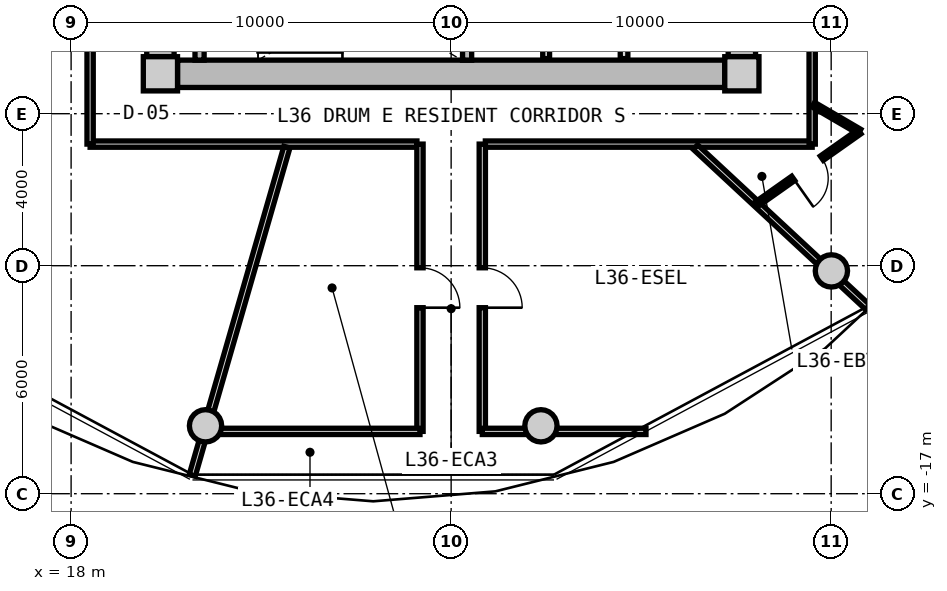
"""IFC4 building model, lengths in metres.
Left out: names, types, materials, properties, quantities, classifications, styles, units other than length and angle.
Written with IfcOpenShell. Run it as: python <this file> out.ifc"""

import sys

from ifc_helpers import new_model, si_unit, direction, frame, frame_2d, origin, origin_2d, place, context, subcontext, project, spatial, rectangle, circle, extrude, source, transform, mapped, element, fill, save


model = new_model("IFC4")
c1 = context("Model", 3, precision=1e-05, world=origin(), true_north=direction((0.0, 1.0)))
c2 = subcontext(c1, "Body", "Model", "MODEL_VIEW")
j1 = project(units=[si_unit("LENGTHUNIT", "METRE"), si_unit("PLANEANGLEUNIT", "RADIAN")], contexts=[c1])
p1 = place(None, origin())
s1 = spatial("IfcSite", under=j1, at=p1, CompositionType="ELEMENT")
p2 = place(p1, origin())
s2 = spatial("IfcBuilding", under=s1, at=p2, CompositionType="ELEMENT")
p3 = place(p2, frame((0.0, 0.0, 117.6)))
s3 = spatial("IfcBuildingStorey", under=s2, at=p3, CompositionType="ELEMENT", Elevation=117.6)
m1 = source(origin(), c2, "Body", "SweptSolid", [
    extrude(rectangle(XDim=0.9, YDim=0.9, at=origin_2d()), origin(), (0.0, 0.0, 1.0), 3.05),
])
for number, where, z_axis, x_axis in (
    (1, (20.35, -5.95, 0.0), (0.0, 0.0, 1.0), (1.0, 0.0, 0.0)),
    (2, (35.65, -5.95, 0.0), (0.0, 0.0, 1.0), (1.0, 0.0, 0.0)),
):
    element("IfcColumn", number, at=place(p3, frame(where, z_axis=z_axis, x_axis=x_axis)), inside=s3, PredefinedType="COLUMN", context=c2, shape_type="MappedRepresentation", body=[
        mapped(m1, transform((0.0, 0.0, 0.0), x_axis=(1.0, 0.0, 0.0), y_axis=(0.0, 1.0, 0.0), z_axis=(0.0, 0.0, 1.0), scale=1.0)),
    ])
m2 = source(origin(), c2, "Body", "SweptSolid", [
    extrude(rectangle(XDim=14.4, YDim=0.72, at=frame_2d((7.2, 0.0))), origin(), (0.0, 0.0, 1.0), 2.79),
])
p4 = place(p3, frame((35.2, -5.95, 0.0), z_axis=(0.0, 0.0, 1.0), x_axis=(-1.0, 0.0, 0.0)))
e3 = element("IfcWall", 3, at=p4, inside=s3, PredefinedType="SHEAR", context=c2, shape_type="MappedRepresentation", body=[
    mapped(m2, transform((0.0, 0.0, 0.0), x_axis=(1.0, 0.0, 0.0), y_axis=(0.0, 1.0, 0.0), z_axis=(0.0, 0.0, 1.0), scale=1.0)),
])
m3 = source(origin(), c2, "Body", "SweptSolid", [
    extrude(rectangle(XDim=11.0, YDim=0.72, at=frame_2d((5.5, 0.0))), origin(), (0.0, 0.0, 1.0), 2.79),
])
p5 = place(p3, frame((20.35, -5.5, 0.0), z_axis=(0.0, 0.0, 1.0), x_axis=(0.0, 1.0, 0.0)))
e4 = element("IfcWall", 4, at=p5, inside=s3, PredefinedType="SHEAR", context=c2, shape_type="MappedRepresentation", body=[
    mapped(m3, transform((0.0, 0.0, 0.0), x_axis=(1.0, 0.0, 0.0), y_axis=(0.0, 1.0, 0.0), z_axis=(0.0, 0.0, 1.0), scale=1.0)),
])
p6 = place(p5, frame((3.8, 0.0, 0.0)))
e5 = element("IfcOpeningElement", 5, at=p6, cuts=e4, PredefinedType="OPENING", context=c2, shape_type="SweptSolid", body=[
    extrude(rectangle(XDim=1.2, YDim=2.15, at=frame_2d((0.6, 1.075))), frame((0.0, 0.37, 0.0), z_axis=(0.0, -1.0, 0.0), x_axis=(1.0, 0.0, 0.0)), (0.0, 0.0, 1.0), 0.74),
])
p7 = place(p3, frame((35.65, 5.5, 0.0), z_axis=(0.0, 0.0, 1.0), x_axis=(0.0, -1.0, 0.0)))
e6 = element("IfcWall", 6, at=p7, inside=s3, PredefinedType="SHEAR", context=c2, shape_type="MappedRepresentation", body=[
    mapped(m3, transform((0.0, 0.0, 0.0), x_axis=(1.0, 0.0, 0.0), y_axis=(0.0, 1.0, 0.0), z_axis=(0.0, 0.0, 1.0), scale=1.0)),
])
p8 = place(p7, frame((5.65, 0.0, 0.0)))
e7 = element("IfcOpeningElement", 7, at=p8, cuts=e6, PredefinedType="OPENING", context=c2, shape_type="SweptSolid", body=[
    extrude(rectangle(XDim=1.2, YDim=2.15, at=frame_2d((0.6, 1.075))), frame((0.0, 0.37, 0.0), z_axis=(0.0, -1.0, 0.0), x_axis=(1.0, 0.0, 0.0)), (0.0, 0.0, 1.0), 0.74),
])
m4 = source(origin(), c2, "Body", "SweptSolid", [
    extrude(circle(Radius=0.425, at=origin_2d()), origin(), (0.0, 0.0, 1.0), 3.05),
])
for number, where, z_axis, x_axis in (
    (8, (21.537, -15.213, 0.0), (0.0, 0.0, 1.0), (1.0, 0.0, 0.0)),
    (9, (30.363, -15.213, 0.0), (0.0, 0.0, 1.0), (1.0, 0.0, 0.0)),
    (10, (38.006, -11.137, 0.0), (0.0, 0.0, 1.0), (1.0, 0.0, 0.0)),
):
    element("IfcColumn", number, at=place(p3, frame(where, z_axis=z_axis, x_axis=x_axis)), inside=s3, PredefinedType="COLUMN", context=c2, shape_type="MappedRepresentation", body=[
        mapped(m4, transform((0.0, 0.0, 0.0), x_axis=(1.0, 0.0, 0.0), y_axis=(0.0, 1.0, 0.0), z_axis=(0.0, 0.0, 1.0), scale=1.0)),
    ])
m5 = source(origin(), c2, "Body", "SweptSolid", [
    extrude(rectangle(XDim=3.14, YDim=0.24, at=frame_2d((1.57, 0.0))), origin(), (0.0, 0.0, 1.0), 2.79),
])
for number, where, z_axis, x_axis in (
    (11, (21.38, -5.59, 0.0), (0.0, 0.0, 1.0), (0.0, 1.0, 0.0)),
    (12, (28.42, -5.59, 0.0), (0.0, 0.0, 1.0), (0.0, 1.0, 0.0)),
):
    element("IfcWall", number, at=place(p3, frame(where, z_axis=z_axis, x_axis=x_axis)), inside=s3, PredefinedType="PARTITIONING", context=c2, shape_type="MappedRepresentation", body=[
        mapped(m5, transform((0.0, 0.0, 0.0), x_axis=(1.0, 0.0, 0.0), y_axis=(0.0, 1.0, 0.0), z_axis=(0.0, 0.0, 1.0), scale=1.0)),
    ])
m6 = source(origin(), c2, "Body", "SweptSolid", [
    extrude(rectangle(XDim=3.8, YDim=0.2, at=frame_2d((1.9, 0.0))), origin(), (0.0, 0.0, 1.0), 2.775),
])
p9 = place(p3, frame((32.55, -5.55, 0.0), z_axis=(0.0, 0.0, 1.0), x_axis=(0.0, 1.0, 0.0)))
e13 = element("IfcWall", 13, at=p9, inside=s3, PredefinedType="PARTITIONING", context=c2, shape_type="MappedRepresentation", body=[
    mapped(m6, transform((0.0, 0.0, 0.0), x_axis=(1.0, 0.0, 0.0), y_axis=(0.0, 1.0, 0.0), z_axis=(0.0, 0.0, 1.0), scale=1.0)),
])
m7 = source(origin(), c2, "Body", "SweptSolid", [
    extrude(rectangle(XDim=3.22, YDim=0.18, at=frame_2d((1.61, 0.0))), origin(), (0.0, 0.0, 1.0), 2.775),
])
p10 = place(p3, frame((30.5, -5.55, 0.0), z_axis=(0.0, 0.0, 1.0), x_axis=(0.0, 1.0, 0.0)))
e14 = element("IfcWall", 14, at=p10, inside=s3, PredefinedType="PARTITIONING", context=c2, shape_type="MappedRepresentation", body=[
    mapped(m7, transform((0.0, 0.0, 0.0), x_axis=(1.0, 0.0, 0.0), y_axis=(0.0, 1.0, 0.0), z_axis=(0.0, 0.0, 1.0), scale=1.0)),
])
m8 = source(origin(), c2, "Body", "SweptSolid", [
    extrude(rectangle(XDim=8.6, YDim=0.165, at=frame_2d((4.3, 0.0))), origin(), (0.0, 0.0, 1.0), 2.775),
])
for number, where, z_axis, x_axis in (
    (15, (37.5, -7.8, 0.0), (0.0, 0.0, 1.0), (-1.0, 0.0, 0.0)),
    (16, (27.1, -7.8, 0.0), (0.0, 0.0, 1.0), (-1.0, 0.0, 0.0)),
):
    element("IfcWall", number, at=place(p3, frame(where, z_axis=z_axis, x_axis=x_axis)), inside=s3, PredefinedType="PARTITIONING", context=c2, shape_type="MappedRepresentation", body=[
        mapped(m8, transform((0.0, 0.0, 0.0), x_axis=(1.0, 0.0, 0.0), y_axis=(0.0, 1.0, 0.0), z_axis=(0.0, 0.0, 1.0), scale=1.0)),
    ])
m9 = source(origin(), c2, "Body", "SweptSolid", [
    extrude(rectangle(XDim=15.6, YDim=0.165, at=frame_2d((7.8, 0.0))), origin(), (0.0, 0.0, 1.0), 2.775),
])
p11 = place(p3, frame((18.5, -7.8, 0.0), z_axis=(0.0, 0.0, 1.0), x_axis=(0.0, 1.0, 0.0)))
e17 = element("IfcWall", 17, at=p11, inside=s3, PredefinedType="PARTITIONING", context=c2, shape_type="MappedRepresentation", body=[
    mapped(m9, transform((0.0, 0.0, 0.0), x_axis=(1.0, 0.0, 0.0), y_axis=(0.0, 1.0, 0.0), z_axis=(0.0, 0.0, 1.0), scale=1.0)),
])
p12 = place(p11, frame((10.383, 0.0, 0.0)))
e18 = element("IfcOpeningElement", 18, at=p12, cuts=e17, PredefinedType="OPENING", context=c2, shape_type="SweptSolid", body=[
    extrude(rectangle(XDim=1.05, YDim=2.15, at=frame_2d((0.525, 1.075))), frame((0.0, 0.093, 0.0), z_axis=(0.0, -1.0, 0.0), x_axis=(1.0, 0.0, 0.0)), (0.0, 0.0, 1.0), 0.185),
])
p13 = place(p11, frame((4.353, 0.0, 0.0)))
e19 = element("IfcOpeningElement", 19, at=p13, cuts=e17, PredefinedType="OPENING", context=c2, shape_type="SweptSolid", body=[
    extrude(rectangle(XDim=1.25, YDim=2.2, at=frame_2d((0.625, 1.1))), frame((0.0, 0.093, 0.0), z_axis=(0.0, -1.0, 0.0), x_axis=(1.0, 0.0, 0.0)), (0.0, 0.0, 1.0), 0.185),
])
p14 = place(p3, frame((37.5, 7.8, 0.0), z_axis=(0.0, 0.0, 1.0), x_axis=(0.0, -1.0, 0.0)))
e20 = element("IfcWall", 20, at=p14, inside=s3, PredefinedType="PARTITIONING", context=c2, shape_type="MappedRepresentation", body=[
    mapped(m9, transform((0.0, 0.0, 0.0), x_axis=(1.0, 0.0, 0.0), y_axis=(0.0, 1.0, 0.0), z_axis=(0.0, 0.0, 1.0), scale=1.0)),
])
p15 = place(p14, frame((6.87, 0.0, 0.0)))
e21 = element("IfcOpeningElement", 21, at=p15, cuts=e20, PredefinedType="OPENING", context=c2, shape_type="SweptSolid", body=[
    extrude(rectangle(XDim=1.05, YDim=2.15, at=frame_2d((0.525, 1.075))), frame((0.0, 0.093, 0.0), z_axis=(0.0, -1.0, 0.0), x_axis=(1.0, 0.0, 0.0)), (0.0, 0.0, 1.0), 0.185),
])
m10 = source(origin(), c2, "Body", "SweptSolid", [
    extrude(rectangle(XDim=8.989, YDim=0.165, at=frame_2d((4.495, 0.0))), origin(), (0.0, 0.0, 1.0), 2.275),
])
p16 = place(p3, frame((23.678, -7.88, 0.0), z_axis=(0.0, 0.0, 1.0), x_axis=(-0.27702323008, -0.960863221274, 0.0)))
e22 = element("IfcWall", 22, at=p16, inside=s3, PredefinedType="PARTITIONING", context=c2, shape_type="MappedRepresentation", body=[
    mapped(m10, transform((0.0, 0.0, 0.0), x_axis=(1.0, 0.0, 0.0), y_axis=(0.0, 1.0, 0.0), z_axis=(0.0, 0.0, 1.0), scale=1.0)),
])
m11 = source(origin(), c2, "Body", "SweptSolid", [
    extrude(rectangle(XDim=6.187, YDim=0.165, at=frame_2d((3.093, 0.0))), origin(), (0.0, 0.0, 1.0), 2.275),
])
p17 = place(p3, frame((34.429, -7.88, 0.0), z_axis=(0.0, 0.0, 1.0), x_axis=(0.732501077882, -0.680765870841, 0.0)))
e23 = element("IfcWall", 23, at=p17, inside=s3, PredefinedType="PARTITIONING", context=c2, shape_type="MappedRepresentation", body=[
    mapped(m11, transform((0.0, 0.0, 0.0), x_axis=(1.0, 0.0, 0.0), y_axis=(0.0, 1.0, 0.0), z_axis=(0.0, 0.0, 1.0), scale=1.0)),
])
m12 = source(origin(), c2, "Body", "SweptSolid", [
    extrude(rectangle(XDim=7.56, YDim=0.165, at=frame_2d((3.78, 0.0))), origin(), (0.0, 0.0, 1.0), 2.775),
])
p18 = place(p3, frame((27.18, -15.36, 0.0), z_axis=(0.0, 0.0, 1.0), x_axis=(0.0, 1.0, 0.0)))
e24 = element("IfcWall", 24, at=p18, inside=s3, PredefinedType="PARTITIONING", context=c2, shape_type="MappedRepresentation", body=[
    mapped(m12, transform((0.0, 0.0, 0.0), x_axis=(1.0, 0.0, 0.0), y_axis=(0.0, 1.0, 0.0), z_axis=(0.0, 0.0, 1.0), scale=1.0)),
])
p19 = place(p18, frame((3.255, 0.0, 0.0)))
e25 = element("IfcOpeningElement", 25, at=p19, cuts=e24, PredefinedType="OPENING", context=c2, shape_type="SweptSolid", body=[
    extrude(rectangle(XDim=1.05, YDim=2.15, at=frame_2d((0.525, 1.075))), frame((0.0, 0.093, 0.0), z_axis=(0.0, -1.0, 0.0), x_axis=(1.0, 0.0, 0.0)), (0.0, 0.0, 1.0), 0.185),
])
m13 = source(origin(), c2, "Body", "SweptSolid", [
    extrude(rectangle(XDim=5.814, YDim=0.165, at=frame_2d((2.907, 0.0))), origin(), (0.0, 0.0, 1.0), 2.275),
])
p20 = place(p3, frame((21.366, -15.36, 0.0), z_axis=(0.0, 0.0, 1.0), x_axis=(1.0, 0.0, 0.0)))
e26 = element("IfcWall", 26, at=p20, inside=s3, PredefinedType="PARTITIONING", context=c2, shape_type="MappedRepresentation", body=[
    mapped(m13, transform((0.0, 0.0, 0.0), x_axis=(1.0, 0.0, 0.0), y_axis=(0.0, 1.0, 0.0), z_axis=(0.0, 0.0, 1.0), scale=1.0)),
])
p21 = place(p3, frame((28.82, -15.36, 0.0), z_axis=(0.0, 0.0, 1.0), x_axis=(0.0, 1.0, 0.0)))
e27 = element("IfcWall", 27, at=p21, inside=s3, PredefinedType="PARTITIONING", context=c2, shape_type="MappedRepresentation", body=[
    mapped(m12, transform((0.0, 0.0, 0.0), x_axis=(1.0, 0.0, 0.0), y_axis=(0.0, 1.0, 0.0), z_axis=(0.0, 0.0, 1.0), scale=1.0)),
])
p22 = place(p21, frame((3.255, 0.0, 0.0)))
e28 = element("IfcOpeningElement", 28, at=p22, cuts=e27, PredefinedType="OPENING", context=c2, shape_type="SweptSolid", body=[
    extrude(rectangle(XDim=1.05, YDim=2.15, at=frame_2d((0.525, 1.075))), frame((0.0, 0.093, 0.0), z_axis=(0.0, -1.0, 0.0), x_axis=(1.0, 0.0, 0.0)), (0.0, 0.0, 1.0), 0.185),
])
m14 = source(origin(), c2, "Body", "SweptSolid", [
    extrude(rectangle(XDim=4.307, YDim=0.165, at=frame_2d((2.153, 0.0))), origin(), (0.0, 0.0, 1.0), 2.275),
])
p23 = place(p3, frame((28.82, -15.36, 0.0), z_axis=(0.0, 0.0, 1.0), x_axis=(1.0, 0.0, 0.0)))
e29 = element("IfcWall", 29, at=p23, inside=s3, PredefinedType="PARTITIONING", context=c2, shape_type="MappedRepresentation", body=[
    mapped(m14, transform((0.0, 0.0, 0.0), x_axis=(1.0, 0.0, 0.0), y_axis=(0.0, 1.0, 0.0), z_axis=(0.0, 0.0, 1.0), scale=1.0)),
])
m15 = source(origin(), c2, "Body", "SweptSolid", [
    extrude(rectangle(XDim=1.407, YDim=0.14, at=frame_2d((0.704, 0.0))), origin(), (0.0, 0.0, 1.0), 2.775),
])
p24 = place(p3, frame((37.53, -6.762, 0.0), z_axis=(0.0, 0.0, 1.0), x_axis=(0.863539718977, -0.504280828258, 0.0)))
e30 = element("IfcWall", 30, at=p24, inside=s3, PredefinedType="PARTITIONING", context=c2, shape_type="MappedRepresentation", body=[
    mapped(m15, transform((0.0, 0.0, 0.0), x_axis=(1.0, 0.0, 0.0), y_axis=(0.0, 1.0, 0.0), z_axis=(0.0, 0.0, 1.0), scale=1.0)),
])
m16 = source(origin(), c2, "Body", "SweptSolid", [
    extrude(rectangle(XDim=3.347, YDim=0.14, at=frame_2d((1.673, 0.0))), origin(), (0.0, 0.0, 1.0), 2.775),
])
p25 = place(p3, frame((38.745, -7.472, 0.0), z_axis=(0.0, 0.0, 1.0), x_axis=(-0.81705680263, -0.576557179537, 0.0)))
e31 = element("IfcWall", 31, at=p25, inside=s3, PredefinedType="PARTITIONING", context=c2, shape_type="MappedRepresentation", body=[
    mapped(m16, transform((0.0, 0.0, 0.0), x_axis=(1.0, 0.0, 0.0), y_axis=(0.0, 1.0, 0.0), z_axis=(0.0, 0.0, 1.0), scale=1.0)),
])
p26 = place(p25, frame((1.214, 0.0, 0.0)))
e32 = element("IfcOpeningElement", 32, at=p26, cuts=e31, PredefinedType="OPENING", context=c2, shape_type="SweptSolid", body=[
    extrude(rectangle(XDim=0.92, YDim=2.1, at=frame_2d((0.46, 1.05))), frame((0.0, 0.08, 0.0), z_axis=(0.0, -1.0, 0.0), x_axis=(1.0, 0.0, 0.0)), (0.0, 0.0, 1.0), 0.16),
])
m17 = source(origin(), c2, "Body", "SweptSolid", [
    extrude(rectangle(XDim=1.05, YDim=2.15, at=frame_2d((0.525, 1.075))), frame((0.0, 0.025, 0.0), z_axis=(0.0, -1.0, 0.0), x_axis=(1.0, 0.0, 0.0)), (0.0, 0.0, 1.0), 0.05),
])
p27 = place(p19, frame((1.05, 0.0, 0.0), z_axis=(0.0, 0.0, 1.0), x_axis=(-1.0, 0.0, 0.0)))
e33 = element("IfcDoor", 33, at=p27, inside=s3, OperationType="SINGLE_SWING_RIGHT", PredefinedType="DOOR", context=c2, shape_type="MappedRepresentation", body=[
    mapped(m17, transform((0.0, 0.0, 0.0), x_axis=(1.0, 0.0, 0.0), y_axis=(0.0, 1.0, 0.0), z_axis=(0.0, 0.0, 1.0), scale=1.0)),
])
fill(e25, e33)
p28 = place(p22, frame((1.05, 0.0, 0.0), z_axis=(0.0, 0.0, 1.0), x_axis=(-1.0, 0.0, 0.0)))
e34 = element("IfcDoor", 34, at=p28, inside=s3, OperationType="SINGLE_SWING_RIGHT", PredefinedType="DOOR", context=c2, shape_type="MappedRepresentation", body=[
    mapped(m17, transform((0.0, 0.0, 0.0), x_axis=(1.0, 0.0, 0.0), y_axis=(0.0, 1.0, 0.0), z_axis=(0.0, 0.0, 1.0), scale=1.0)),
])
fill(e28, e34)
m18 = source(origin(), c2, "Body", "SweptSolid", [
    extrude(rectangle(XDim=0.92, YDim=2.1, at=frame_2d((0.46, 1.05))), frame((0.0, 0.025, 0.0), z_axis=(0.0, -1.0, 0.0), x_axis=(1.0, 0.0, 0.0)), (0.0, 0.0, 1.0), 0.05),
])
p29 = place(p26, origin())
e35 = element("IfcDoor", 35, at=p29, inside=s3, OperationType="SINGLE_SWING_RIGHT", PredefinedType="DOOR", context=c2, shape_type="MappedRepresentation", body=[
    mapped(m18, transform((0.0, 0.0, 0.0), x_axis=(1.0, 0.0, 0.0), y_axis=(0.0, 1.0, 0.0), z_axis=(0.0, 0.0, 1.0), scale=1.0)),
])
fill(e32, e35)
save(model, sys.argv[1])
